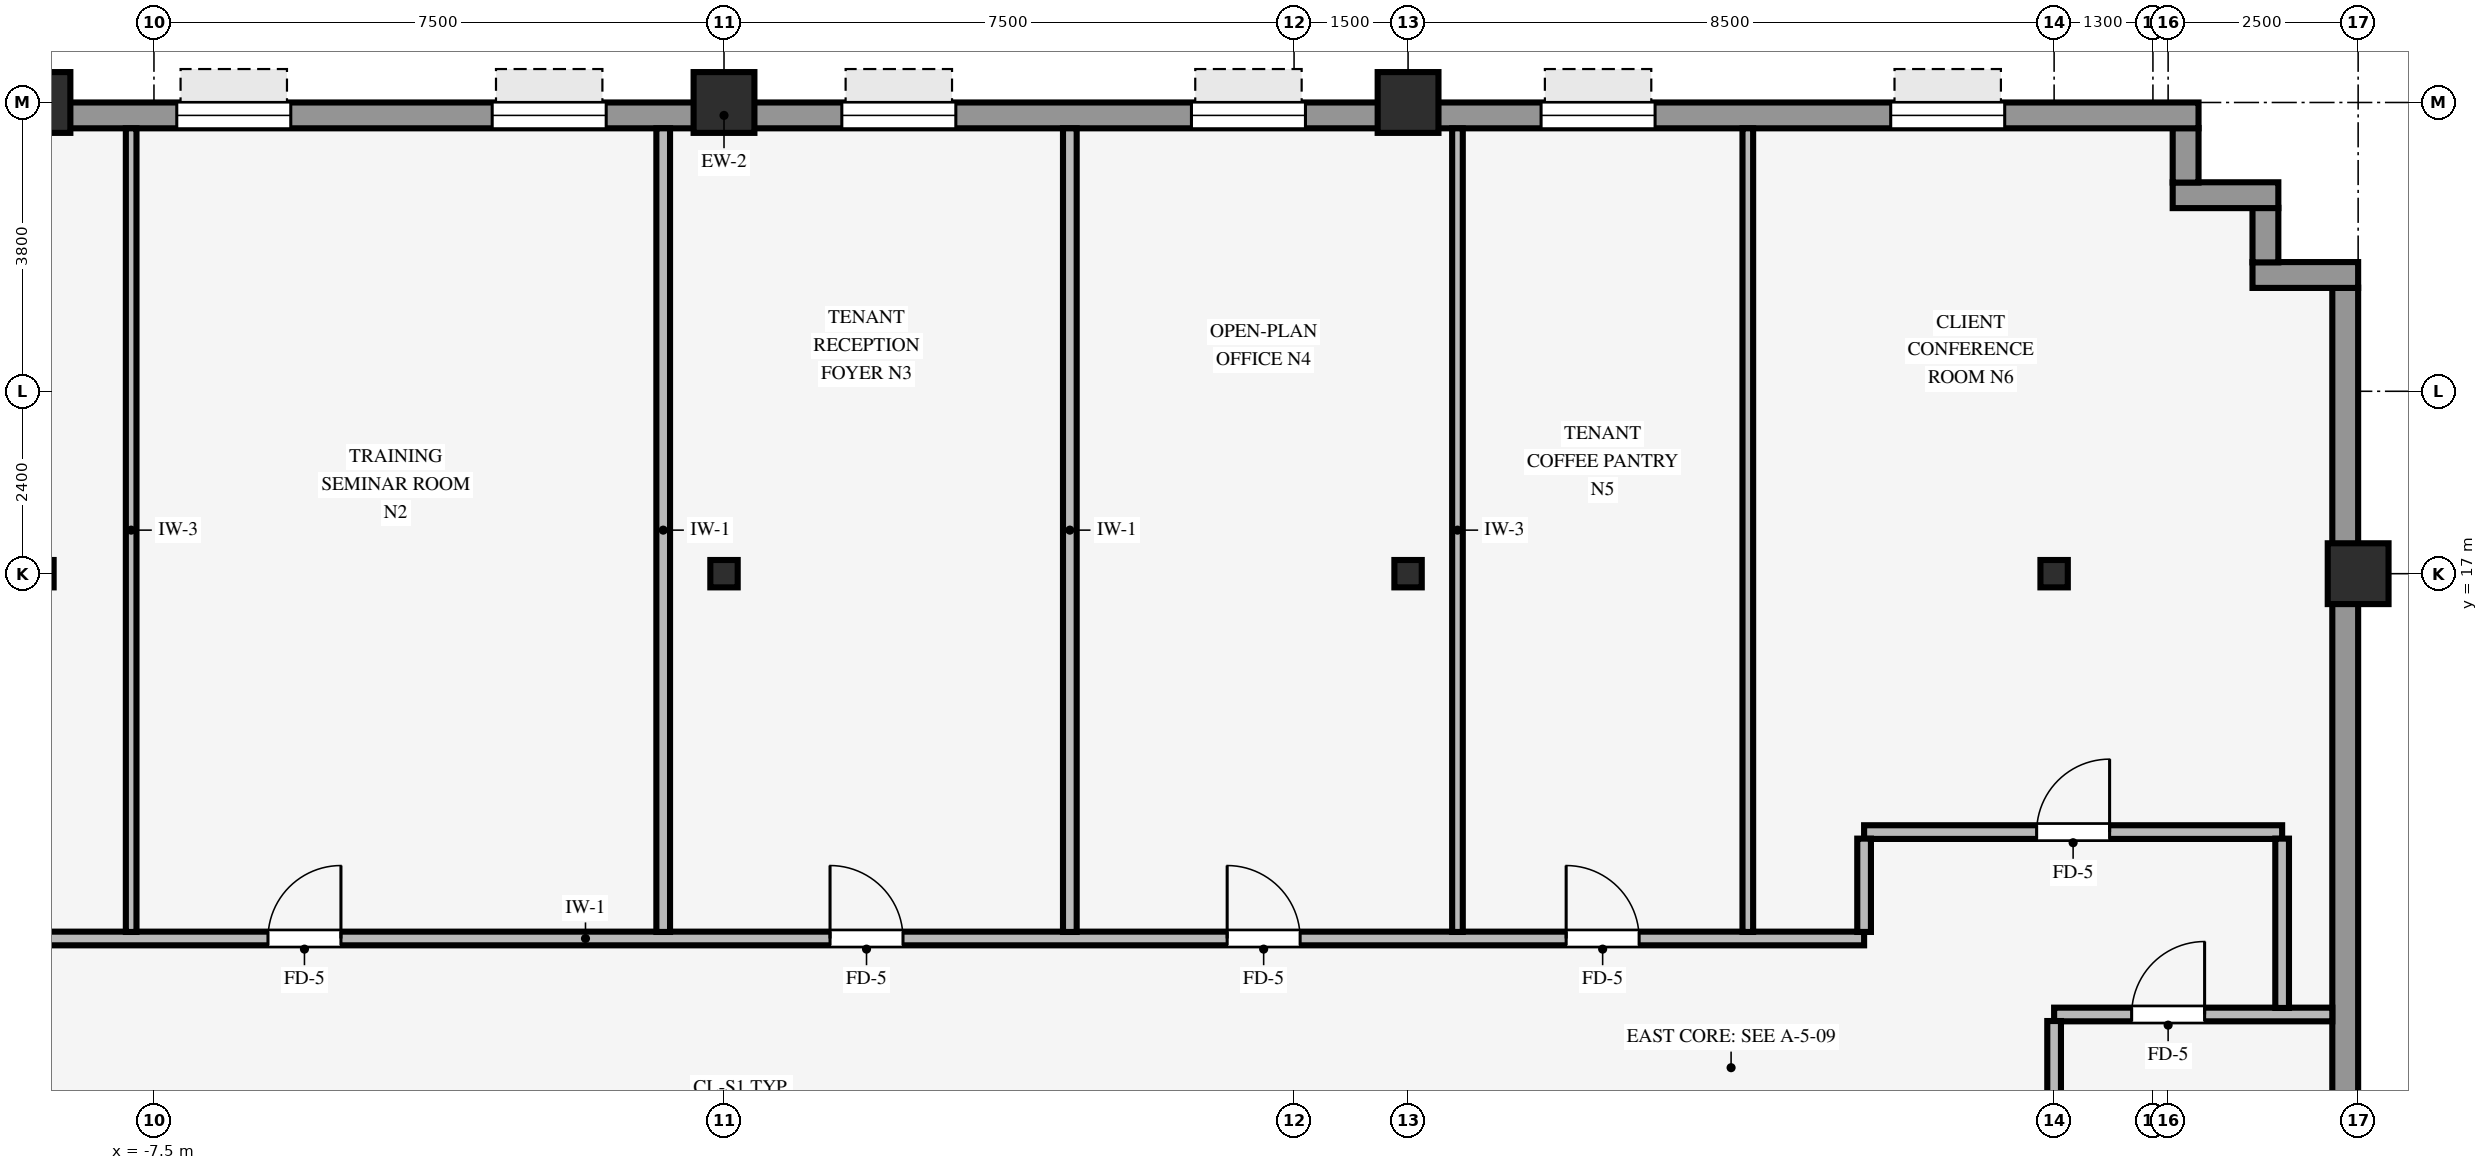
"""IFC4 building model, lengths in metres.
Left out: names, types, materials, properties, quantities, classifications, styles, units other than length and angle.
Written with IfcOpenShell. Run it as: python <this file> out.ifc"""

import sys

from ifc_helpers import new_model, si_unit, direction, frame, frame_2d, origin, origin_2d, place, context, subcontext, project, spatial, rectangle, hollow_rectangle, i_section, extrude, source, transform, mapped, element, fill, save


model = new_model("IFC4")
c1 = context("Model", 3, precision=1e-05, world=origin(), true_north=direction((0.0, 1.0)))
c2 = subcontext(c1, "Body", "Model", "MODEL_VIEW")
j1 = project(units=[si_unit("LENGTHUNIT", "METRE"), si_unit("PLANEANGLEUNIT", "RADIAN")], contexts=[c1])
p1 = place(None, origin())
s1 = spatial("IfcSite", under=j1, at=p1, CompositionType="ELEMENT")
p2 = place(p1, origin())
s2 = spatial("IfcBuilding", under=s1, at=p2, CompositionType="ELEMENT")
p3 = place(p2, frame((0.0, 0.0, 78.7)))
s3 = spatial("IfcBuildingStorey", under=s2, at=p3, CompositionType="ELEMENT", Elevation=78.7)
for number, where, z_axis, x_axis in (
    (1, (21.5, 17.0, 0.0), (0.0, 0.0, 1.0), (1.0, 0.0, 0.0)),
    (2, (-9.0, 23.2, 0.0), (0.0, 0.0, 1.0), (1.0, 0.0, 0.0)),
    (3, (0.0, 23.2, 0.0), (0.0, 0.0, 1.0), (1.0, 0.0, 0.0)),
    (4, (9.0, 23.2, 0.0), (0.0, 0.0, 1.0), (1.0, 0.0, 0.0)),
):
    element("IfcColumn", number, at=place(p3, frame(where, z_axis=z_axis, x_axis=x_axis)), inside=s3, PredefinedType="COLUMN", context=c2, shape_type="SweptSolid", body=[
        extrude(hollow_rectangle(XDim=0.8, YDim=0.8, WallThickness=0.055, InnerFilletRadius=0.055, OuterFilletRadius=0.11, at=origin_2d()), origin(), (0.0, 0.0, 1.0), 3.37),
    ])
for number, where, z_axis, x_axis in (
    (5, (0.0, 17.0, 0.0), (0.0, 0.0, 1.0), (1.0, 0.0, 0.0)),
    (6, (-9.0, 17.0, 0.0), (0.0, 0.0, 1.0), (1.0, 0.0, 0.0)),
    (7, (9.0, 17.0, 0.0), (0.0, 0.0, 1.0), (1.0, 0.0, 0.0)),
    (8, (17.5, 17.0, 0.0), (0.0, 0.0, 1.0), (1.0, 0.0, 0.0)),
):
    element("IfcColumn", number, at=place(p3, frame(where, z_axis=z_axis, x_axis=x_axis)), inside=s3, PredefinedType="COLUMN", context=c2, shape_type="SweptSolid", body=[
        extrude(i_section(OverallWidth=0.36, OverallDepth=0.36, WebThickness=0.021, FlangeThickness=0.021, FilletRadius=0.018, at=origin_2d()), origin(), (0.0, 0.0, 1.0), 3.37),
    ])
p4 = place(p3, frame((21.33, -20.764, 0.0), z_axis=(0.0, 0.0, 1.0), x_axis=(0.0, 1.0, 0.0)))
e9 = element("IfcWall", 9, at=p4, inside=s3, PredefinedType="STANDARD", context=c2, shape_type="SweptSolid", body=[
    extrude(rectangle(XDim=41.528, YDim=0.34, at=frame_2d((20.764, 0.0))), origin(), (0.0, 0.0, 1.0), 2.705),
])
p5 = place(p4, frame((12.202, 0.0, 0.8)))
e10 = element("IfcOpeningElement", 10, at=p5, cuts=e9, PredefinedType="OPENING", context=c2, shape_type="SweptSolid", body=[
    extrude(rectangle(XDim=2.3, YDim=1.62, at=frame_2d((1.15, 0.81))), frame((0.0, 0.18, 0.0), z_axis=(0.0, -1.0, 0.0), x_axis=(1.0, 0.0, 0.0)), (0.0, 0.0, 1.0), 0.36),
])
p6 = place(p4, frame((15.793, 0.0, 0.8)))
e11 = element("IfcOpeningElement", 11, at=p6, cuts=e9, PredefinedType="OPENING", context=c2, shape_type="SweptSolid", body=[
    extrude(rectangle(XDim=2.3, YDim=1.62, at=frame_2d((1.15, 0.81))), frame((0.0, 0.18, 0.0), z_axis=(0.0, -1.0, 0.0), x_axis=(1.0, 0.0, 0.0)), (0.0, 0.0, 1.0), 0.36),
])
p7 = place(p4, frame((22.084, 0.0, 0.8)))
e12 = element("IfcOpeningElement", 12, at=p7, cuts=e9, PredefinedType="OPENING", context=c2, shape_type="SweptSolid", body=[
    extrude(rectangle(XDim=2.3, YDim=1.62, at=frame_2d((1.15, 0.81))), frame((0.0, 0.18, 0.0), z_axis=(0.0, -1.0, 0.0), x_axis=(1.0, 0.0, 0.0)), (0.0, 0.0, 1.0), 0.36),
])
p8 = place(p4, frame((27.025, 0.0, 0.8)))
e13 = element("IfcOpeningElement", 13, at=p8, cuts=e9, PredefinedType="OPENING", context=c2, shape_type="SweptSolid", body=[
    extrude(rectangle(XDim=2.3, YDim=1.62, at=frame_2d((1.15, 0.81))), frame((0.0, 0.18, 0.0), z_axis=(0.0, -1.0, 0.0), x_axis=(1.0, 0.0, 0.0)), (0.0, 0.0, 1.0), 0.36),
])
p9 = place(p3, frame((20.11, 20.93, 0.0), z_axis=(0.0, 0.0, 1.0), x_axis=(1.0, 0.0, 0.0)))
e14 = element("IfcWall", 14, at=p9, inside=s3, PredefinedType="STANDARD", context=c2, shape_type="SweptSolid", body=[
    extrude(rectangle(XDim=1.39, YDim=0.34, at=frame_2d((0.695, 0.0))), origin(), (0.0, 0.0, 1.0), 3.36),
])
p10 = place(p3, frame((20.28, 21.096, 0.0), z_axis=(0.0, 0.0, 1.0), x_axis=(0.0, 1.0, 0.0)))
e15 = element("IfcWall", 15, at=p10, inside=s3, PredefinedType="STANDARD", context=c2, shape_type="SweptSolid", body=[
    extrude(rectangle(XDim=0.718, YDim=0.34, at=frame_2d((0.359, 0.0))), origin(), (0.0, 0.0, 1.0), 3.36),
])
p11 = place(p3, frame((19.06, 21.98, 0.0), z_axis=(0.0, 0.0, 1.0), x_axis=(1.0, 0.0, 0.0)))
e16 = element("IfcWall", 16, at=p11, inside=s3, PredefinedType="STANDARD", context=c2, shape_type="SweptSolid", body=[
    extrude(rectangle(XDim=1.39, YDim=0.34, at=frame_2d((0.695, 0.0))), origin(), (0.0, 0.0, 1.0), 3.36),
])
p12 = place(p3, frame((19.23, 22.146, 0.0), z_axis=(0.0, 0.0, 1.0), x_axis=(0.0, 1.0, 0.0)))
e17 = element("IfcWall", 17, at=p12, inside=s3, PredefinedType="STANDARD", context=c2, shape_type="SweptSolid", body=[
    extrude(rectangle(XDim=0.718, YDim=0.34, at=frame_2d((0.359, 0.0))), origin(), (0.0, 0.0, 1.0), 3.36),
])
p13 = place(p3, frame((-19.4, 23.03, 0.0), z_axis=(0.0, 0.0, 1.0), x_axis=(1.0, 0.0, 0.0)))
e18 = element("IfcWall", 18, at=p13, inside=s3, PredefinedType="STANDARD", context=c2, shape_type="SweptSolid", body=[
    extrude(rectangle(XDim=38.8, YDim=0.34, at=frame_2d((19.4, 0.0))), origin(), (0.0, 0.0, 1.0), 2.705),
])
p14 = place(p13, frame((2.55, 0.0, 0.8)))
e19 = element("IfcOpeningElement", 19, at=p14, cuts=e18, PredefinedType="OPENING", context=c2, shape_type="SweptSolid", body=[
    extrude(rectangle(XDim=1.5, YDim=1.6, at=frame_2d((0.75, 0.8))), frame((0.0, 0.18, 0.0), z_axis=(0.0, -1.0, 0.0), x_axis=(1.0, 0.0, 0.0)), (0.0, 0.0, 1.0), 0.36),
])
p15 = place(p13, frame((7.15, 0.0, 0.8)))
e20 = element("IfcOpeningElement", 20, at=p15, cuts=e18, PredefinedType="OPENING", context=c2, shape_type="SweptSolid", body=[
    extrude(rectangle(XDim=1.5, YDim=1.6, at=frame_2d((0.75, 0.8))), frame((0.0, 0.18, 0.0), z_axis=(0.0, -1.0, 0.0), x_axis=(1.0, 0.0, 0.0)), (0.0, 0.0, 1.0), 0.36),
])
p16 = place(p13, frame((12.2, 0.0, 0.8)))
e21 = element("IfcOpeningElement", 21, at=p16, cuts=e18, PredefinedType="OPENING", context=c2, shape_type="SweptSolid", body=[
    extrude(rectangle(XDim=1.5, YDim=1.6, at=frame_2d((0.75, 0.8))), frame((0.0, 0.18, 0.0), z_axis=(0.0, -1.0, 0.0), x_axis=(1.0, 0.0, 0.0)), (0.0, 0.0, 1.0), 0.36),
])
p17 = place(p13, frame((16.35, 0.0, 0.8)))
e22 = element("IfcOpeningElement", 22, at=p17, cuts=e18, PredefinedType="OPENING", context=c2, shape_type="SweptSolid", body=[
    extrude(rectangle(XDim=1.5, YDim=1.6, at=frame_2d((0.75, 0.8))), frame((0.0, 0.18, 0.0), z_axis=(0.0, -1.0, 0.0), x_axis=(1.0, 0.0, 0.0)), (0.0, 0.0, 1.0), 0.36),
])
p18 = place(p13, frame((20.95, 0.0, 0.8)))
e23 = element("IfcOpeningElement", 23, at=p18, cuts=e18, PredefinedType="OPENING", context=c2, shape_type="SweptSolid", body=[
    extrude(rectangle(XDim=1.5, YDim=1.6, at=frame_2d((0.75, 0.8))), frame((0.0, 0.18, 0.0), z_axis=(0.0, -1.0, 0.0), x_axis=(1.0, 0.0, 0.0)), (0.0, 0.0, 1.0), 0.36),
])
p19 = place(p13, frame((25.55, 0.0, 0.8)))
e24 = element("IfcOpeningElement", 24, at=p19, cuts=e18, PredefinedType="OPENING", context=c2, shape_type="SweptSolid", body=[
    extrude(rectangle(XDim=1.5, YDim=1.6, at=frame_2d((0.75, 0.8))), frame((0.0, 0.18, 0.0), z_axis=(0.0, -1.0, 0.0), x_axis=(1.0, 0.0, 0.0)), (0.0, 0.0, 1.0), 0.36),
])
p20 = place(p13, frame((30.15, 0.0, 0.8)))
e25 = element("IfcOpeningElement", 25, at=p20, cuts=e18, PredefinedType="OPENING", context=c2, shape_type="SweptSolid", body=[
    extrude(rectangle(XDim=1.5, YDim=1.6, at=frame_2d((0.75, 0.8))), frame((0.0, 0.18, 0.0), z_axis=(0.0, -1.0, 0.0), x_axis=(1.0, 0.0, 0.0)), (0.0, 0.0, 1.0), 0.36),
])
p21 = place(p13, frame((34.75, 0.0, 0.8)))
e26 = element("IfcOpeningElement", 26, at=p21, cuts=e18, PredefinedType="OPENING", context=c2, shape_type="SweptSolid", body=[
    extrude(rectangle(XDim=1.5, YDim=1.6, at=frame_2d((0.75, 0.8))), frame((0.0, 0.18, 0.0), z_axis=(0.0, -1.0, 0.0), x_axis=(1.0, 0.0, 0.0)), (0.0, 0.0, 1.0), 0.36),
])
p22 = place(p3, frame((17.5, 11.2, 0.0), z_axis=(0.0, 0.0, 1.0), x_axis=(1.0, 0.0, 0.0)))
e27 = element("IfcWall", 27, at=p22, inside=s3, PredefinedType="PARTITIONING", context=c2, shape_type="SweptSolid", body=[
    extrude(rectangle(XDim=3.66, YDim=0.18, at=frame_2d((1.83, 0.0))), origin(), (0.0, 0.0, 1.0), 3.36),
])
p23 = place(p22, frame((1.02, 0.0, 0.0)))
e28 = element("IfcOpeningElement", 28, at=p23, cuts=e27, PredefinedType="OPENING", context=c2, shape_type="SweptSolid", body=[
    extrude(rectangle(XDim=0.96, YDim=2.1, at=frame_2d((0.48, 1.05))), frame((0.0, 0.1, 0.0), z_axis=(0.0, -1.0, 0.0), x_axis=(1.0, 0.0, 0.0)), (0.0, 0.0, 1.0), 0.2),
])
p24 = place(p3, frame((-15.0, 12.2, 0.0), z_axis=(0.0, 0.0, 1.0), x_axis=(1.0, 0.0, 0.0)))
e29 = element("IfcWall", 29, at=p24, inside=s3, PredefinedType="PARTITIONING", context=c2, shape_type="SweptSolid", body=[
    extrude(rectangle(XDim=30.0, YDim=0.18, at=frame_2d((15.0, 0.0))), origin(), (0.0, 0.0, 1.0), 3.36),
])
p25 = place(p24, frame((3.1, 0.0, 0.0)))
e30 = element("IfcOpeningElement", 30, at=p25, cuts=e29, PredefinedType="OPENING", context=c2, shape_type="SweptSolid", body=[
    extrude(rectangle(XDim=0.96, YDim=2.1, at=frame_2d((0.48, 1.05))), frame((0.0, 0.1, 0.0), z_axis=(0.0, -1.0, 0.0), x_axis=(1.0, 0.0, 0.0)), (0.0, 0.0, 1.0), 0.2),
])
p26 = place(p24, frame((16.395, 0.0, 0.0)))
e31 = element("IfcOpeningElement", 31, at=p26, cuts=e29, PredefinedType="OPENING", context=c2, shape_type="SweptSolid", body=[
    extrude(rectangle(XDim=0.96, YDim=2.1, at=frame_2d((0.48, 1.05))), frame((0.0, 0.1, 0.0), z_axis=(0.0, -1.0, 0.0), x_axis=(1.0, 0.0, 0.0)), (0.0, 0.0, 1.0), 0.2),
])
p27 = place(p24, frame((21.62, 0.0, 0.0)))
e32 = element("IfcOpeningElement", 32, at=p27, cuts=e29, PredefinedType="OPENING", context=c2, shape_type="SweptSolid", body=[
    extrude(rectangle(XDim=0.96, YDim=2.1, at=frame_2d((0.48, 1.05))), frame((0.0, 0.1, 0.0), z_axis=(0.0, -1.0, 0.0), x_axis=(1.0, 0.0, 0.0)), (0.0, 0.0, 1.0), 0.2),
])
p28 = place(p24, frame((9.0, 0.0, 0.0)))
e33 = element("IfcOpeningElement", 33, at=p28, cuts=e29, PredefinedType="OPENING", context=c2, shape_type="SweptSolid", body=[
    extrude(rectangle(XDim=0.96, YDim=2.1, at=frame_2d((0.48, 1.05))), frame((0.0, 0.1, 0.0), z_axis=(0.0, -1.0, 0.0), x_axis=(1.0, 0.0, 0.0)), (0.0, 0.0, 1.0), 0.2),
])
p29 = place(p24, frame((26.08, 0.0, 0.0)))
e34 = element("IfcOpeningElement", 34, at=p29, cuts=e29, PredefinedType="OPENING", context=c2, shape_type="SweptSolid", body=[
    extrude(rectangle(XDim=0.96, YDim=2.1, at=frame_2d((0.48, 1.05))), frame((0.0, 0.1, 0.0), z_axis=(0.0, -1.0, 0.0), x_axis=(1.0, 0.0, 0.0)), (0.0, 0.0, 1.0), 0.2),
])
p30 = place(p3, frame((15.0, 13.6, 0.0), z_axis=(0.0, 0.0, 1.0), x_axis=(1.0, 0.0, 0.0)))
e35 = element("IfcWall", 35, at=p30, inside=s3, PredefinedType="PARTITIONING", context=c2, shape_type="SweptSolid", body=[
    extrude(rectangle(XDim=5.5, YDim=0.18, at=frame_2d((2.75, 0.0))), origin(), (0.0, 0.0, 1.0), 2.942),
])
p31 = place(p30, frame((2.27, 0.0, 0.0)))
e36 = element("IfcOpeningElement", 36, at=p31, cuts=e35, PredefinedType="OPENING", context=c2, shape_type="SweptSolid", body=[
    extrude(rectangle(XDim=0.96, YDim=2.1, at=frame_2d((0.48, 1.05))), frame((0.0, 0.1, 0.0), z_axis=(0.0, -1.0, 0.0), x_axis=(1.0, 0.0, 0.0)), (0.0, 0.0, 1.0), 0.2),
])
p32 = place(p3, frame((-7.8, 12.286, 0.0), z_axis=(0.0, 0.0, 1.0), x_axis=(0.0, 1.0, 0.0)))
e37 = element("IfcWall", 37, at=p32, inside=s3, PredefinedType="PARTITIONING", context=c2, shape_type="SweptSolid", body=[
    extrude(rectangle(XDim=10.574, YDim=0.14, at=frame_2d((5.287, 0.0))), origin(), (0.0, 0.0, 1.0), 3.36),
])
for number, where, z_axis, x_axis in (
    (38, (-0.8, 12.286, 0.0), (0.0, 0.0, 1.0), (0.0, 1.0, 0.0)),
    (39, (4.55, 12.286, 0.0), (0.0, 0.0, 1.0), (0.0, 1.0, 0.0)),
):
    element("IfcWall", number, at=place(p3, frame(where, z_axis=z_axis, x_axis=x_axis)), inside=s3, PredefinedType="PARTITIONING", context=c2, shape_type="SweptSolid", body=[
        extrude(rectangle(XDim=10.574, YDim=0.18, at=frame_2d((5.287, 0.0))), origin(), (0.0, 0.0, 1.0), 3.36),
    ])
for number, where, z_axis, x_axis in (
    (40, (9.65, 12.286, 0.0), (0.0, 0.0, 1.0), (0.0, 1.0, 0.0)),
    (41, (13.47, 12.286, 0.0), (0.0, 0.0, 1.0), (0.0, 1.0, 0.0)),
):
    element("IfcWall", number, at=place(p3, frame(where, z_axis=z_axis, x_axis=x_axis)), inside=s3, PredefinedType="PARTITIONING", context=c2, shape_type="SweptSolid", body=[
        extrude(rectangle(XDim=10.574, YDim=0.14, at=frame_2d((5.287, 0.0))), origin(), (0.0, 0.0, 1.0), 3.36),
    ])
p33 = place(p3, frame((15.0, 12.286, 0.0), z_axis=(0.0, 0.0, 1.0), x_axis=(0.0, 1.0, 0.0)))
e42 = element("IfcWall", 42, at=p33, inside=s3, PredefinedType="PARTITIONING", context=c2, shape_type="SweptSolid", body=[
    extrude(rectangle(XDim=1.228, YDim=0.18, at=frame_2d((0.614, 0.0))), origin(), (0.0, 0.0, 1.0), 3.36),
])
p34 = place(p3, frame((17.5, 10.146, 0.0), z_axis=(0.0, 0.0, 1.0), x_axis=(0.0, 1.0, 0.0)))
e43 = element("IfcWall", 43, at=p34, inside=s3, PredefinedType="PARTITIONING", context=c2, shape_type="SweptSolid", body=[
    extrude(rectangle(XDim=0.968, YDim=0.18, at=frame_2d((0.484, 0.0))), origin(), (0.0, 0.0, 1.0), 2.738),
])
p35 = place(p3, frame((20.5, 11.286, 0.0), z_axis=(0.0, 0.0, 1.0), x_axis=(0.0, 1.0, 0.0)))
e44 = element("IfcWall", 44, at=p35, inside=s3, PredefinedType="PARTITIONING", context=c2, shape_type="SweptSolid", body=[
    extrude(rectangle(XDim=2.228, YDim=0.18, at=frame_2d((1.114, 0.0))), origin(), (0.0, 0.0, 1.0), 3.36),
])
m1 = source(origin(), c2, "Body", "SweptSolid", [
    extrude(rectangle(XDim=1.5, YDim=1.6, at=frame_2d((0.75, 0.8))), frame((0.0, 0.03, 0.0), z_axis=(0.0, -1.0, 0.0), x_axis=(1.0, 0.0, 0.0)), (0.0, 0.0, 1.0), 0.06),
])
p36 = place(p16, origin())
e45 = element("IfcWindow", 45, at=p36, inside=s3, PartitioningType="SINGLE_PANEL", PredefinedType="WINDOW", context=c2, shape_type="MappedRepresentation", body=[
    mapped(m1, transform((0.0, 0.0, 0.0), scale=1.0)),
])
fill(e21, e45)
p37 = place(p17, origin())
e46 = element("IfcWindow", 46, at=p37, inside=s3, PartitioningType="SINGLE_PANEL", PredefinedType="WINDOW", context=c2, shape_type="MappedRepresentation", body=[
    mapped(m1, transform((0.0, 0.0, 0.0), scale=1.0)),
])
fill(e22, e46)
p38 = place(p18, origin())
e47 = element("IfcWindow", 47, at=p38, inside=s3, PartitioningType="SINGLE_PANEL", PredefinedType="WINDOW", context=c2, shape_type="MappedRepresentation", body=[
    mapped(m1, transform((0.0, 0.0, 0.0), scale=1.0)),
])
fill(e23, e47)
p39 = place(p19, origin())
e48 = element("IfcWindow", 48, at=p39, inside=s3, PartitioningType="SINGLE_PANEL", PredefinedType="WINDOW", context=c2, shape_type="MappedRepresentation", body=[
    mapped(m1, transform((0.0, 0.0, 0.0), scale=1.0)),
])
fill(e24, e48)
p40 = place(p20, origin())
e49 = element("IfcWindow", 49, at=p40, inside=s3, PartitioningType="SINGLE_PANEL", PredefinedType="WINDOW", context=c2, shape_type="MappedRepresentation", body=[
    mapped(m1, transform((0.0, 0.0, 0.0), scale=1.0)),
])
fill(e25, e49)
p41 = place(p21, origin())
e50 = element("IfcWindow", 50, at=p41, inside=s3, PartitioningType="SINGLE_PANEL", PredefinedType="WINDOW", context=c2, shape_type="MappedRepresentation", body=[
    mapped(m1, transform((0.0, 0.0, 0.0), scale=1.0)),
])
fill(e26, e50)
m2 = source(origin(), c2, "Body", "SweptSolid", [
    extrude(rectangle(XDim=0.96, YDim=2.1, at=frame_2d((0.48, 1.05))), frame((0.0, 0.025, 0.0), z_axis=(0.0, -1.0, 0.0), x_axis=(1.0, 0.0, 0.0)), (0.0, 0.0, 1.0), 0.05),
])
p42 = place(p31, origin())
e51 = element("IfcDoor", 51, at=p42, inside=s3, OperationType="SINGLE_SWING_RIGHT", PredefinedType="DOOR", context=c2, shape_type="MappedRepresentation", body=[
    mapped(m2, transform((0.0, 0.0, 0.0), scale=1.0)),
])
fill(e36, e51)
p43 = place(p26, origin())
e52 = element("IfcDoor", 52, at=p43, inside=s3, OperationType="SINGLE_SWING_LEFT", PredefinedType="DOOR", context=c2, shape_type="MappedRepresentation", body=[
    mapped(m2, transform((0.0, 0.0, 0.0), scale=1.0)),
])
fill(e31, e52)
p44 = place(p27, origin())
e53 = element("IfcDoor", 53, at=p44, inside=s3, OperationType="SINGLE_SWING_LEFT", PredefinedType="DOOR", context=c2, shape_type="MappedRepresentation", body=[
    mapped(m2, transform((0.0, 0.0, 0.0), scale=1.0)),
])
fill(e32, e53)
p45 = place(p28, origin())
e54 = element("IfcDoor", 54, at=p45, inside=s3, OperationType="SINGLE_SWING_RIGHT", PredefinedType="DOOR", context=c2, shape_type="MappedRepresentation", body=[
    mapped(m2, transform((0.0, 0.0, 0.0), scale=1.0)),
])
fill(e33, e54)
p46 = place(p29, origin())
e55 = element("IfcDoor", 55, at=p46, inside=s3, OperationType="SINGLE_SWING_LEFT", PredefinedType="DOOR", context=c2, shape_type="MappedRepresentation", body=[
    mapped(m2, transform((0.0, 0.0, 0.0), scale=1.0)),
])
fill(e34, e55)
p47 = place(p23, origin())
e56 = element("IfcDoor", 56, at=p47, inside=s3, OperationType="SINGLE_SWING_RIGHT", PredefinedType="DOOR", context=c2, shape_type="MappedRepresentation", body=[
    mapped(m2, transform((0.0, 0.0, 0.0), scale=1.0)),
])
fill(e28, e56)
save(model, sys.argv[1])
